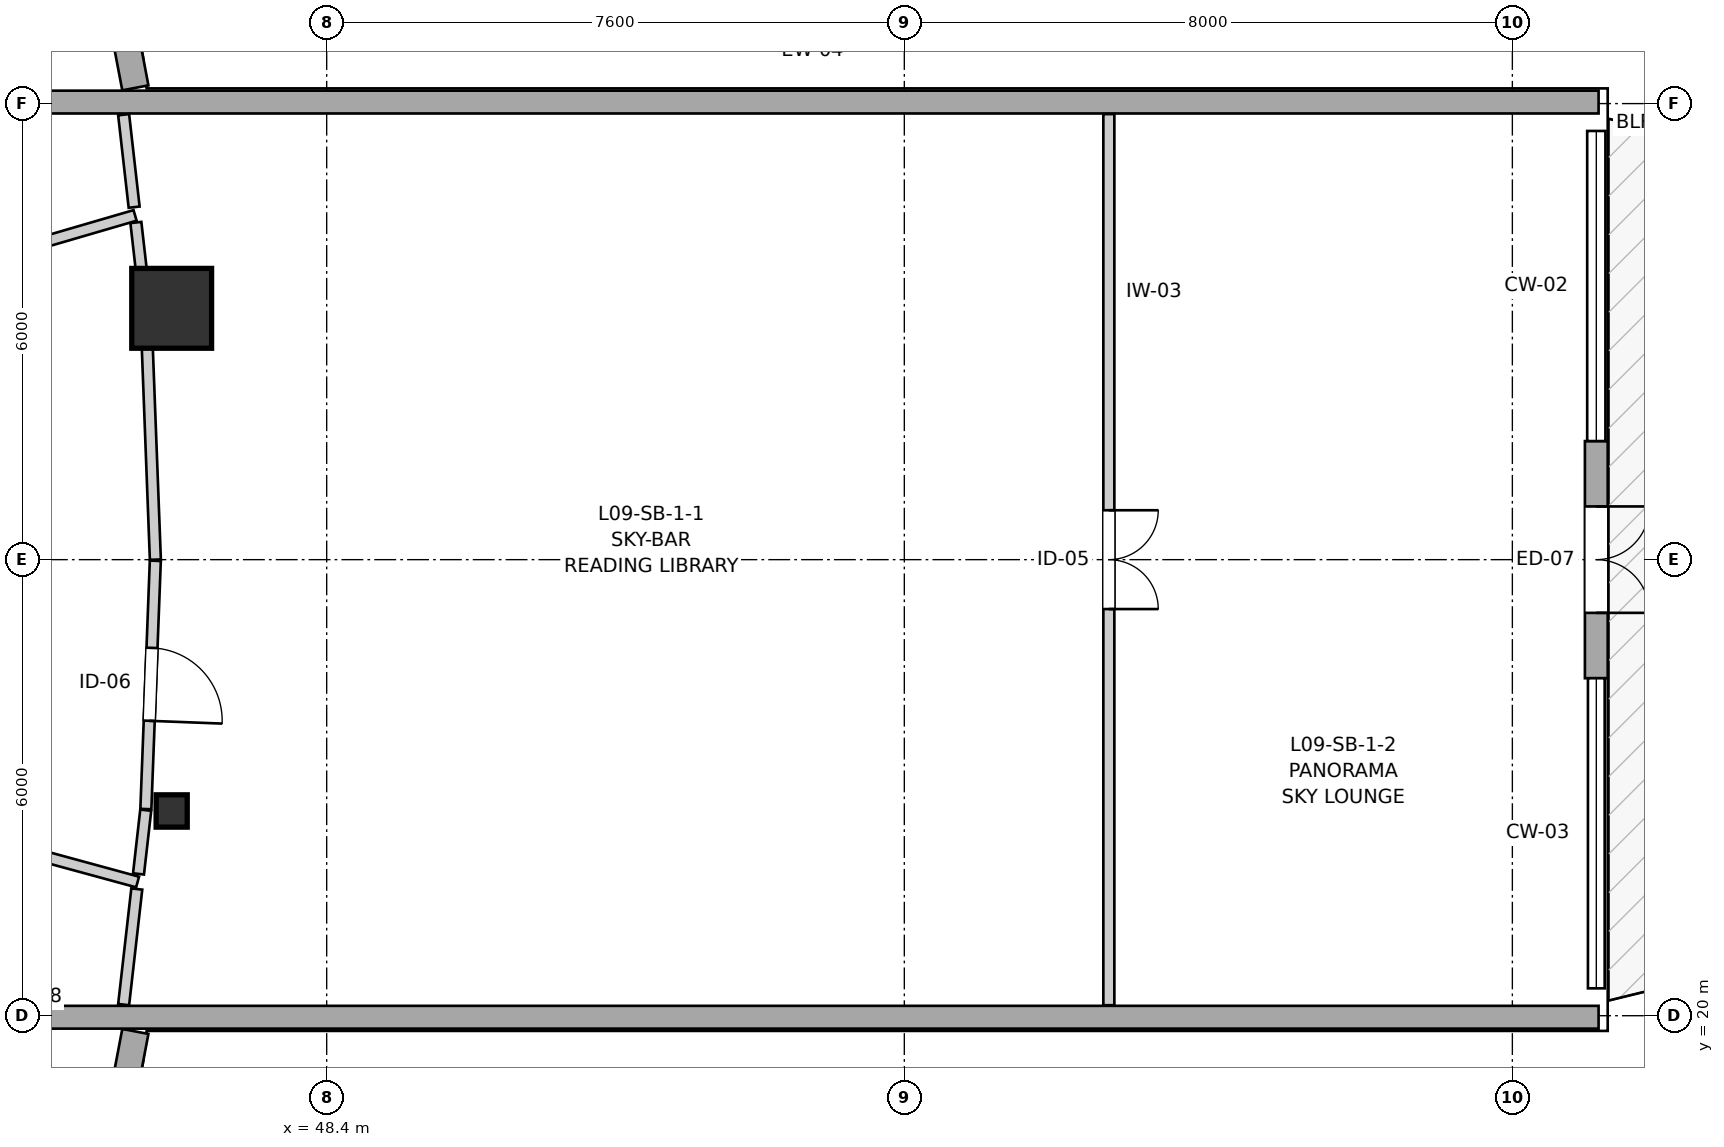
"""IFC4 building model, lengths in metres.
Left out: names, types, materials, properties, quantities, classifications, styles, units other than length and angle.
Written with IfcOpenShell. Run it as: python <this file> out.ifc"""

import sys

from ifc_helpers import new_model, si_unit, direction, frame, frame_2d, origin, origin_2d, place, context, subcontext, project, spatial, rectangle, i_section, extrude, source, transform, mapped, element, fill, save


model = new_model("IFC4")
c1 = context("Model", 3, precision=1e-05, world=origin(), true_north=direction((0.0, 1.0)))
c2 = subcontext(c1, "Body", "Model", "MODEL_VIEW")
j1 = project(units=[si_unit("LENGTHUNIT", "METRE"), si_unit("PLANEANGLEUNIT", "RADIAN")], contexts=[c1])
p1 = place(None, origin())
s1 = spatial("IfcSite", under=j1, at=p1, CompositionType="ELEMENT")
p2 = place(p1, origin())
s2 = spatial("IfcBuilding", under=s1, at=p2, CompositionType="ELEMENT")
p3 = place(p2, frame((0.0, 0.0, 33.4)))
s3 = spatial("IfcBuildingStorey", under=s2, at=p3, CompositionType="ELEMENT", Elevation=33.4)
m1 = source(origin(), c2, "Body", "SweptSolid", [
    extrude(i_section(OverallWidth=0.409, OverallDepth=0.425, WebThickness=0.03, FlangeThickness=0.048, FilletRadius=0.015, at=origin_2d()), origin(), (0.0, 0.0, 1.0), 2.94),
])
p4 = place(p3, frame((46.361, 22.694, 0.0), z_axis=(0.0, 0.0, 1.0), x_axis=(1.0, 0.0, 0.0)))
e1 = element("IfcColumn", 1, at=p4, inside=s3, PredefinedType="PILASTER", context=c2, shape_type="MappedRepresentation", body=[
    mapped(m1, transform((0.0, 0.0, 0.0), x_axis=(1.0, 0.0, 0.0), y_axis=(0.0, 1.0, 0.0), z_axis=(0.0, 0.0, 1.0), scale=1.0)),
])
m2 = source(origin(), c2, "Body", "SweptSolid", [
    extrude(rectangle(XDim=1.05, YDim=1.05, at=origin_2d()), origin(), (0.0, 0.0, 1.0), 2.94),
])
p5 = place(p3, frame((46.361, 29.306, 0.0), z_axis=(0.0, 0.0, 1.0), x_axis=(1.0, 0.0, 0.0)))
e2 = element("IfcColumn", 2, at=p5, inside=s3, PredefinedType="COLUMN", context=c2, shape_type="MappedRepresentation", body=[
    mapped(m2, transform((0.0, 0.0, 0.0), x_axis=(1.0, 0.0, 0.0), y_axis=(0.0, 1.0, 0.0), z_axis=(0.0, 0.0, 1.0), scale=1.0)),
])
p6 = place(p3, frame((45.24, 16.408, 0.0), z_axis=(0.0, 0.0, 1.0), x_axis=(0.186636709983, 0.982428999209, 0.0)))
e3 = element("IfcWall", 3, at=p6, inside=s3, PredefinedType="SOLIDWALL", context=c2, shape_type="SweptSolid", body=[
    extrude(rectangle(XDim=3.446, YDim=0.35, at=frame_2d((1.723, 0.0))), origin(), (0.0, 0.0, 1.0), 2.42),
])
p7 = place(p6, frame((0.828, 0.0, 0.82)))
e4 = element("IfcOpeningElement", 4, at=p7, cuts=e3, PredefinedType="OPENING", context=c2, shape_type="SweptSolid", body=[
    extrude(rectangle(XDim=1.45, YDim=1.25, at=frame_2d((0.725, 0.625))), frame((0.0, 0.185, 0.0), z_axis=(0.0, -1.0, 0.0), x_axis=(1.0, 0.0, 0.0)), (0.0, 0.0, 1.0), 0.37),
])
p8 = place(p3, frame((45.883, 32.207, 0.0), z_axis=(0.0, 0.0, 1.0), x_axis=(-0.186693533797, 0.982418202416, 0.0)))
e5 = element("IfcWall", 5, at=p8, inside=s3, PredefinedType="SOLIDWALL", context=c2, shape_type="SweptSolid", body=[
    extrude(rectangle(XDim=3.726, YDim=0.35, at=frame_2d((1.863, 0.0))), origin(), (0.0, 0.0, 1.0), 2.42),
])
p9 = place(p8, frame((1.313, 0.0, 0.82)))
e6 = element("IfcOpeningElement", 6, at=p9, cuts=e5, PredefinedType="OPENING", context=c2, shape_type="SweptSolid", body=[
    extrude(rectangle(XDim=1.45, YDim=1.25, at=frame_2d((0.725, 0.625))), frame((0.0, 0.185, 0.0), z_axis=(0.0, -1.0, 0.0), x_axis=(1.0, 0.0, 0.0)), (0.0, 0.0, 1.0), 0.37),
])
for number, where, z_axis, x_axis in (
    (7, (44.45, 32.02, 0.0), (0.0, 0.0, 1.0), (1.0, 0.0, 0.0)),
    (8, (44.45, 19.98, 0.0), (0.0, 0.0, 1.0), (1.0, 0.0, 0.0)),
):
    element("IfcWall", number, at=place(p3, frame(where, z_axis=z_axis, x_axis=x_axis)), inside=s3, PredefinedType="SOLIDWALL", context=c2, shape_type="SweptSolid", body=[
        extrude(rectangle(XDim=20.685, YDim=0.3, at=frame_2d((10.342, 0.0))), origin(), (0.0, 0.0, 1.0), 2.12),
    ])
p10 = place(p3, frame((65.104, 27.56, 0.0), z_axis=(0.0, 0.0, 1.0), x_axis=(0.0, -1.0, 0.0)))
e9 = element("IfcWall", 9, at=p10, inside=s3, PredefinedType="SOLIDWALL", context=c2, shape_type="SweptSolid", body=[
    extrude(rectangle(XDim=3.12, YDim=0.3, at=frame_2d((1.56, 0.0))), origin(), (0.0, 0.0, 1.0), 2.3),
])
p11 = place(p10, frame((0.86, 0.0, 0.0)))
e10 = element("IfcOpeningElement", 10, at=p11, cuts=e9, PredefinedType="OPENING", context=c2, shape_type="SweptSolid", body=[
    extrude(rectangle(XDim=1.4, YDim=2.15, at=frame_2d((0.7, 1.075))), frame((0.0, 0.16, 0.0), z_axis=(0.0, -1.0, 0.0), x_axis=(1.0, 0.0, 0.0)), (0.0, 0.0, 1.0), 0.32),
])
p12 = place(p3, frame((58.691, 31.862, 0.0), z_axis=(0.0, 0.0, 1.0), x_axis=(0.0, -1.0, 0.0)))
e11 = element("IfcWall", 11, at=p12, inside=s3, PredefinedType="PARTITIONING", context=c2, shape_type="SweptSolid", body=[
    extrude(rectangle(XDim=11.724, YDim=0.145, at=frame_2d((5.862, 0.0))), origin(), (0.0, 0.0, 1.0), 2.383),
])
p13 = place(p12, frame((5.212, 0.0, 0.0)))
e12 = element("IfcOpeningElement", 12, at=p13, cuts=e11, PredefinedType="OPENING", context=c2, shape_type="SweptSolid", body=[
    extrude(rectangle(XDim=1.3, YDim=2.1, at=frame_2d((0.65, 1.05))), frame((0.0, 0.083, 0.0), z_axis=(0.0, -1.0, 0.0), x_axis=(1.0, 0.0, 0.0)), (0.0, 0.0, 1.0), 0.165),
])
p14 = place(p3, frame((46.146, 25.985, 0.0), z_axis=(0.0, 0.0, 1.0), x_axis=(-0.038094618751, -0.999274136572, 0.0)))
e13 = element("IfcWall", 13, at=p14, inside=s3, PredefinedType="PARTITIONING", context=c2, shape_type="SweptSolid", body=[
    extrude(rectangle(XDim=3.269, YDim=0.145, at=frame_2d((1.634, 0.0))), origin(), (0.0, 0.0, 1.0), 2.408),
])
p15 = place(p14, frame((1.147, 0.0, 0.0)))
e14 = element("IfcOpeningElement", 14, at=p15, cuts=e13, PredefinedType="OPENING", context=c2, shape_type="SweptSolid", body=[
    extrude(rectangle(XDim=0.96, YDim=2.1, at=frame_2d((0.48, 1.05))), frame((0.0, 0.083, 0.0), z_axis=(0.0, -1.0, 0.0), x_axis=(1.0, 0.0, 0.0)), (0.0, 0.0, 1.0), 0.165),
])
p16 = place(p3, frame((38.81, 32.306, 0.0), z_axis=(0.0, 0.0, 1.0), x_axis=(0.801799720797, 0.597592844443, 0.0)))
e15 = element("IfcWall", 15, at=p16, inside=s3, PredefinedType="PARTITIONING", context=c2, shape_type="SweptSolid", body=[
    extrude(rectangle(XDim=7.424, YDim=0.145, at=frame_2d((3.712, 0.0))), origin(), (0.0, 0.0, 1.0), 2.94),
])
p17 = place(p3, frame((38.788, 28.46, 0.0), z_axis=(0.0, 0.0, 1.0), x_axis=(0.959983709987, 0.280055845432, 0.0)))
e16 = element("IfcWall", 16, at=p17, inside=s3, PredefinedType="PARTITIONING", context=c2, shape_type="SweptSolid", body=[
    extrude(rectangle(XDim=7.386, YDim=0.145, at=frame_2d((3.693, 0.0))), origin(), (0.0, 0.0, 1.0), 2.94),
])
p18 = place(p3, frame((38.787, 23.701, 0.0), z_axis=(0.0, 0.0, 1.0), x_axis=(0.964810342249, -0.262946769308, 0.0)))
e17 = element("IfcWall", 17, at=p18, inside=s3, PredefinedType="PARTITIONING", context=c2, shape_type="SweptSolid", body=[
    extrude(rectangle(XDim=7.385, YDim=0.145, at=frame_2d((3.692, 0.0))), origin(), (0.0, 0.0, 1.0), 2.94),
])
p19 = place(p3, frame((46.021, 29.281, 0.0), z_axis=(0.0, 0.0, 1.0), x_axis=(0.038070453861, -0.999275057501, 0.0)))
e18 = element("IfcWall", 18, at=p19, inside=s3, PredefinedType="PARTITIONING", context=c2, shape_type="SweptSolid", body=[
    extrude(rectangle(XDim=3.283, YDim=0.145, at=frame_2d((1.642, 0.0))), origin(), (0.0, 0.0, 1.0), 2.408),
])
p20 = place(p3, frame((45.729, 20.146, 0.0), z_axis=(0.0, 0.0, 1.0), x_axis=(0.113074294354, 0.993586535716, 0.0)))
e19 = element("IfcWall", 19, at=p20, inside=s3, PredefinedType="PARTITIONING", context=c2, shape_type="SweptSolid", body=[
    extrude(rectangle(XDim=1.531, YDim=0.145, at=frame_2d((0.765, 0.0))), origin(), (0.0, 0.0, 1.0), 2.408),
])
p21 = place(p3, frame((45.89, 30.436, 0.0), z_axis=(0.0, 0.0, 1.0), x_axis=(0.113024308153, -0.993592223081, 0.0)))
e20 = element("IfcWall", 20, at=p21, inside=s3, PredefinedType="PARTITIONING", context=c2, shape_type="SweptSolid", body=[
    extrude(rectangle(XDim=1.147, YDim=0.145, at=frame_2d((0.573, 0.0))), origin(), (0.0, 0.0, 1.0), 2.408),
])
p22 = place(p3, frame((45.729, 31.854, 0.0), z_axis=(0.0, 0.0, 1.0), x_axis=(0.112860473391, -0.993610846129, 0.0)))
e21 = element("IfcWall", 21, at=p22, inside=s3, PredefinedType="PARTITIONING", context=c2, shape_type="SweptSolid", body=[
    extrude(rectangle(XDim=1.224, YDim=0.145, at=frame_2d((0.612, 0.0))), origin(), (0.0, 0.0, 1.0), 2.408),
])
p23 = place(p3, frame((45.924, 21.866, 0.0), z_axis=(0.0, 0.0, 1.0), x_axis=(0.112844765803, 0.993612630169, 0.0)))
e22 = element("IfcWall", 22, at=p23, inside=s3, PredefinedType="PARTITIONING", context=c2, shape_type="SweptSolid", body=[
    extrude(rectangle(XDim=0.844, YDim=0.145, at=frame_2d((0.422, 0.0))), origin(), (0.0, 0.0, 1.0), 2.408),
])
m3 = source(origin(), c2, "Body", "SweptSolid", [
    extrude(rectangle(XDim=1.4, YDim=2.15, at=frame_2d((0.7, 1.075))), frame((0.0, 0.025, 0.0), z_axis=(0.0, -1.0, 0.0), x_axis=(1.0, 0.0, 0.0)), (0.0, 0.0, 1.0), 0.05),
])
p24 = place(p11, origin())
e23 = element("IfcDoor", 23, at=p24, inside=s3, OperationType="DOUBLE_DOOR_SINGLE_SWING", PredefinedType="DOOR", context=c2, shape_type="MappedRepresentation", body=[
    mapped(m3, transform((0.0, 0.0, 0.0), x_axis=(1.0, 0.0, 0.0), y_axis=(0.0, 1.0, 0.0), z_axis=(0.0, 0.0, 1.0), scale=1.0)),
])
fill(e10, e23)
m4 = source(origin(), c2, "Body", "SweptSolid", [
    extrude(rectangle(XDim=1.3, YDim=2.1, at=frame_2d((0.65, 1.05))), frame((0.0, 0.025, 0.0), z_axis=(0.0, -1.0, 0.0), x_axis=(1.0, 0.0, 0.0)), (0.0, 0.0, 1.0), 0.05),
])
p25 = place(p13, origin())
e24 = element("IfcDoor", 24, at=p25, inside=s3, OperationType="DOUBLE_DOOR_SINGLE_SWING", PredefinedType="DOOR", context=c2, shape_type="MappedRepresentation", body=[
    mapped(m4, transform((0.0, 0.0, 0.0), x_axis=(1.0, 0.0, 0.0), y_axis=(0.0, 1.0, 0.0), z_axis=(0.0, 0.0, 1.0), scale=1.0)),
])
fill(e12, e24)
m5 = source(origin(), c2, "Body", "SweptSolid", [
    extrude(rectangle(XDim=0.96, YDim=2.1, at=frame_2d((0.48, 1.05))), frame((0.0, 0.025, 0.0), z_axis=(0.0, -1.0, 0.0), x_axis=(1.0, 0.0, 0.0)), (0.0, 0.0, 1.0), 0.05),
])
p26 = place(p15, origin())
e25 = element("IfcDoor", 25, at=p26, inside=s3, OperationType="SINGLE_SWING_RIGHT", PredefinedType="DOOR", context=c2, shape_type="MappedRepresentation", body=[
    mapped(m5, transform((0.0, 0.0, 0.0), x_axis=(1.0, 0.0, 0.0), y_axis=(0.0, 1.0, 0.0), z_axis=(0.0, 0.0, 1.0), scale=1.0)),
])
fill(e14, e25)
save(model, sys.argv[1])
